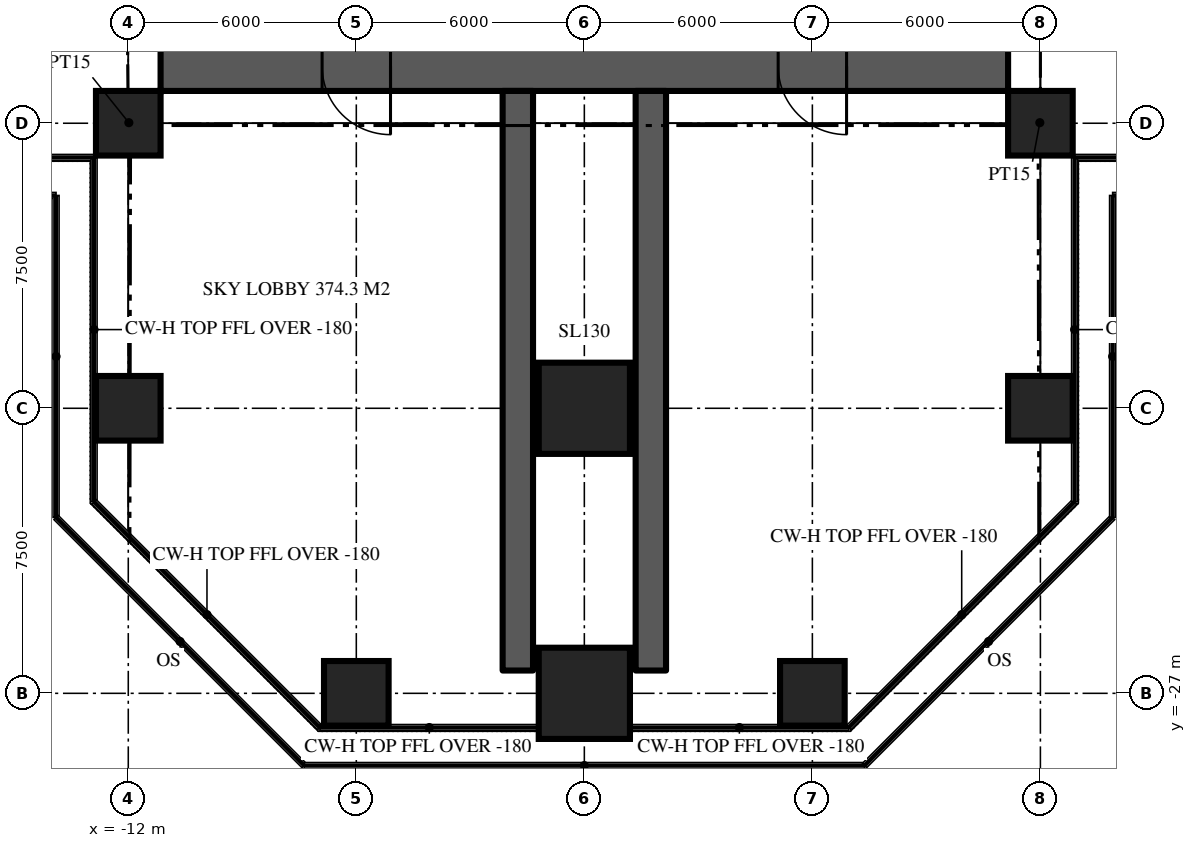
"""IFC4 building model, lengths in metres.
Left out: names, types, materials, properties, quantities, classifications, styles, units other than length and angle.
Written with IfcOpenShell. Run it as: python <this file> out.ifc"""

import sys

from ifc_helpers import new_model, si_unit, direction, frame, frame_2d, origin, origin_2d, place, context, subcontext, project, spatial, rectangle, extrude, element, fill, save


model = new_model("IFC4")
c1 = context("Model", 3, precision=1e-05, world=origin(), true_north=direction((0.0, 1.0)))
c2 = subcontext(c1, "Body", "Model", "MODEL_VIEW")
j1 = project(units=[si_unit("LENGTHUNIT", "METRE"), si_unit("PLANEANGLEUNIT", "RADIAN")], contexts=[c1])
p1 = place(None, origin())
s1 = spatial("IfcSite", under=j1, at=p1, CompositionType="ELEMENT")
p2 = place(p1, origin())
s2 = spatial("IfcBuilding", under=s1, at=p2, CompositionType="ELEMENT")
p3 = place(p2, frame((0.0, 0.0, 194.4)))
s3 = spatial("IfcBuildingStorey", under=s2, at=p3, CompositionType="ELEMENT", Elevation=194.4)
p4 = place(p3, frame((11.15, -10.5, 0.0), z_axis=(0.0, 0.0, 1.0), x_axis=(-1.0, 0.0, 0.0)))
e1 = element("IfcWall", 1, at=p4, inside=s3, PredefinedType="SHEAR", context=c2, shape_type="SweptSolid", body=[
    extrude(rectangle(XDim=22.3, YDim=1.3, at=frame_2d((11.15, 0.0))), origin(), (0.0, 0.0, 1.0), 4.5),
])
p5 = place(p4, frame((16.25, 0.0, 0.0)))
e2 = element("IfcOpeningElement", 2, at=p5, cuts=e1, PredefinedType="OPENING", context=c2, shape_type="SweptSolid", body=[
    extrude(rectangle(XDim=1.8, YDim=2.2, at=frame_2d((0.9, 1.1))), frame((0.0, 0.66, 0.0), z_axis=(0.0, -1.0, 0.0), x_axis=(1.0, 0.0, 0.0)), (0.0, 0.0, 1.0), 1.32),
])
p6 = place(p4, frame((4.25, 0.0, 0.0)))
e3 = element("IfcOpeningElement", 3, at=p6, cuts=e1, PredefinedType="OPENING", context=c2, shape_type="SweptSolid", body=[
    extrude(rectangle(XDim=1.8, YDim=2.2, at=frame_2d((0.9, 1.1))), frame((0.0, 0.66, 0.0), z_axis=(0.0, -1.0, 0.0), x_axis=(1.0, 0.0, 0.0)), (0.0, 0.0, 1.0), 1.32),
])
for number, where, z_axis, x_axis in (
    (4, (-1.75, -11.15, 0.0), (0.0, 0.0, 1.0), (0.0, -1.0, 0.0)),
    (5, (1.75, -11.15, 0.0), (0.0, 0.0, 1.0), (0.0, -1.0, 0.0)),
):
    element("IfcWall", number, at=place(p3, frame(where, z_axis=z_axis, x_axis=x_axis)), inside=s3, PredefinedType="SHEAR", context=c2, shape_type="SweptSolid", body=[
        extrude(rectangle(XDim=15.25, YDim=0.8, at=frame_2d((7.625, 0.0))), origin(), (0.0, 0.0, 1.0), 4.5),
    ])
p7 = place(p3, frame((-6.0, -27.0, 0.0), z_axis=(0.0, 0.0, 1.0), x_axis=(1.0, 0.0, 0.0)))
e6 = element("IfcColumn", 6, at=p7, inside=s3, PredefinedType="COLUMN", context=c2, shape_type="SweptSolid", body=[
    extrude(rectangle(XDim=1.7, YDim=1.7, at=origin_2d()), origin(), (0.0, 0.0, 1.0), 4.5),
])
p8 = place(p3, frame((0.0, -27.0, 0.0), z_axis=(0.0, 0.0, 1.0), x_axis=(1.0, 0.0, 0.0)))
e7 = element("IfcColumn", 7, at=p8, inside=s3, PredefinedType="COLUMN", context=c2, shape_type="SweptSolid", body=[
    extrude(rectangle(XDim=2.4, YDim=2.4, at=origin_2d()), origin(), (0.0, 0.0, 1.0), 4.5),
])
for number, where, z_axis, x_axis in (
    (8, (6.0, -27.0, 0.0), (0.0, 0.0, 1.0), (1.0, 0.0, 0.0)),
    (9, (-12.0, -19.5, 0.0), (0.0, 0.0, 1.0), (1.0, 0.0, 0.0)),
):
    element("IfcColumn", number, at=place(p3, frame(where, z_axis=z_axis, x_axis=x_axis)), inside=s3, PredefinedType="COLUMN", context=c2, shape_type="SweptSolid", body=[
        extrude(rectangle(XDim=1.7, YDim=1.7, at=origin_2d()), origin(), (0.0, 0.0, 1.0), 4.5),
    ])
p9 = place(p3, frame((0.0, -19.5, 0.0), z_axis=(0.0, 0.0, 1.0), x_axis=(1.0, 0.0, 0.0)))
e10 = element("IfcColumn", 10, at=p9, inside=s3, PredefinedType="COLUMN", context=c2, shape_type="SweptSolid", body=[
    extrude(rectangle(XDim=2.4, YDim=2.4, at=origin_2d()), origin(), (0.0, 0.0, 1.0), 4.5),
])
for number, where, z_axis, x_axis in (
    (11, (12.0, -19.5, 0.0), (0.0, 0.0, 1.0), (1.0, 0.0, 0.0)),
    (12, (-12.0, -12.0, 0.0), (0.0, 0.0, 1.0), (1.0, 0.0, 0.0)),
    (13, (12.0, -12.0, 0.0), (0.0, 0.0, 1.0), (1.0, 0.0, 0.0)),
):
    element("IfcColumn", number, at=place(p3, frame(where, z_axis=z_axis, x_axis=x_axis)), inside=s3, PredefinedType="COLUMN", context=c2, shape_type="SweptSolid", body=[
        extrude(rectangle(XDim=1.7, YDim=1.7, at=origin_2d()), origin(), (0.0, 0.0, 1.0), 4.5),
    ])
for number, where, z_axis, x_axis in (
    (14, (-11.15, -11.15, 0.0), (0.0, 0.0, 1.0), (-0.707, -0.707, 0.0)),
    (15, (11.15, -11.15, 0.0), (0.0, 0.0, 1.0), (0.707, -0.707, 0.0)),
):
    element("IfcWall", number, at=place(p3, frame(where, z_axis=z_axis, x_axis=x_axis)), inside=s3, PredefinedType="PARTITIONING", context=c2, shape_type="SweptSolid", body=[
        extrude(rectangle(XDim=2.362, YDim=0.15, at=frame_2d((1.181, 0.0))), origin(), (0.0, 0.0, 1.0), 4.32),
    ])
p10 = place(p5, origin())
e16 = element("IfcDoor", 16, at=p10, inside=s3, OperationType="DOUBLE_DOOR_DOUBLE_SWING", PredefinedType="DOOR", context=c2, shape_type="SweptSolid", body=[
    extrude(rectangle(XDim=1.8, YDim=2.2, at=frame_2d((0.9, 1.1))), frame((0.0, 0.025, 0.0), z_axis=(0.0, -1.0, 0.0), x_axis=(1.0, 0.0, 0.0)), (0.0, 0.0, 1.0), 0.05),
])
fill(e2, e16)
p11 = place(p6, origin())
e17 = element("IfcDoor", 17, at=p11, inside=s3, OperationType="DOUBLE_DOOR_DOUBLE_SWING", PredefinedType="DOOR", context=c2, shape_type="SweptSolid", body=[
    extrude(rectangle(XDim=1.8, YDim=2.2, at=frame_2d((0.9, 1.1))), frame((0.0, 0.025, 0.0), z_axis=(0.0, -1.0, 0.0), x_axis=(1.0, 0.0, 0.0)), (0.0, 0.0, 1.0), 0.05),
])
fill(e3, e17)
save(model, sys.argv[1])
